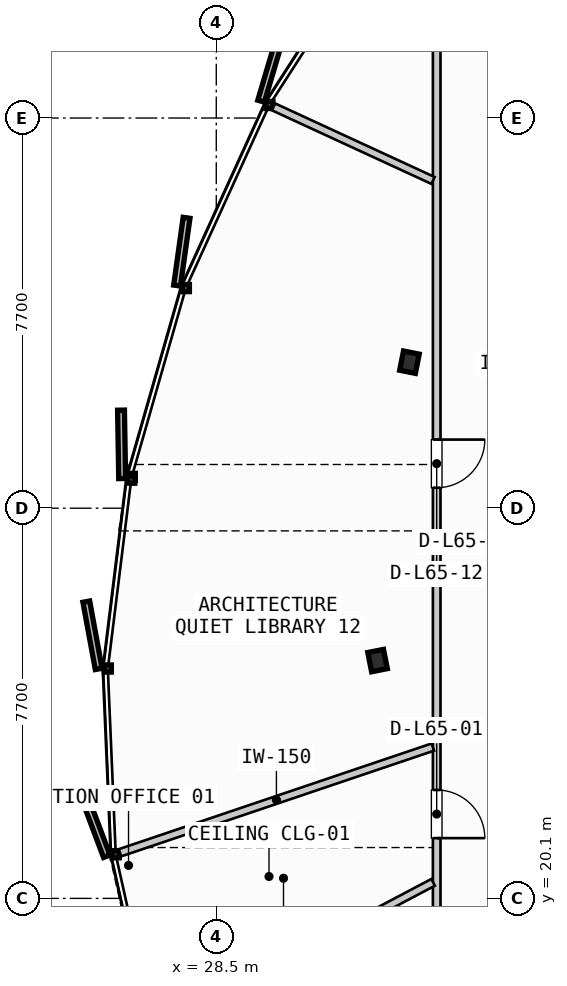
"""IFC4 building model, lengths in metres.
Left out: names, types, materials, properties, quantities, classifications, styles, units other than length and angle.
Written with IfcOpenShell. Run it as: python <this file> out.ifc"""

import sys

from ifc_helpers import new_model, si_unit, direction, frame, frame_2d, origin, origin_2d, place, context, subcontext, project, spatial, rectangle, i_section, extrude, source, transform, mapped, element, fill, save


model = new_model("IFC4")
c1 = context("Model", 3, precision=1e-05, world=origin(), true_north=direction((0.0, 1.0)))
c2 = subcontext(c1, "Body", "Model", "MODEL_VIEW")
j1 = project(units=[si_unit("LENGTHUNIT", "METRE"), si_unit("PLANEANGLEUNIT", "RADIAN")], contexts=[c1])
p1 = place(None, origin())
s1 = spatial("IfcSite", under=j1, at=p1, CompositionType="ELEMENT")
p2 = place(p1, origin())
s2 = spatial("IfcBuilding", under=s1, at=p2, CompositionType="ELEMENT")
p3 = place(p2, frame((0.0, 0.0, 249.1)))
s3 = spatial("IfcBuildingStorey", under=s2, at=p3, CompositionType="ELEMENT", Elevation=249.1)
m1 = source(origin(), c2, "Body", "SweptSolid", [
    extrude(i_section(OverallWidth=0.387, OverallDepth=0.316, WebThickness=0.019, FlangeThickness=0.028, FilletRadius=0.015, at=origin_2d()), origin(), (0.0, 0.0, 1.0), 3.21),
])
for number, where, z_axis, x_axis in (
    (1, (32.312, 30.682, 0.0), (0.0, 0.0, 1.0), (-0.981, 0.195, 0.0)),
    (2, (31.683, 24.793, 0.0), (0.0, 0.0, 1.0), (-0.981, -0.195, 0.0)),
):
    element("IfcColumn", number, at=place(p3, frame(where, z_axis=z_axis, x_axis=x_axis)), inside=s3, PredefinedType="COLUMN", context=c2, shape_type="MappedRepresentation", body=[
        mapped(m1, transform((0.0, 0.0, 0.0), scale=1.0)),
    ])
p4 = place(p3, frame((32.85, 37.562, 0.0), z_axis=(0.0, 0.0, 1.0), x_axis=(0.0, -1.0, 0.0)))
e3 = element("IfcWall", 3, at=p4, inside=s3, PredefinedType="PARTITIONING", context=c2, shape_type="SweptSolid", body=[
    extrude(rectangle(XDim=19.293, YDim=0.15, at=frame_2d((9.646, 0.0))), origin(), (0.0, 0.0, 1.0), 2.28),
])
p5 = place(p4, frame((15.323, 0.0, 0.0)))
e4 = element("IfcOpeningElement", 4, at=p5, cuts=e3, PredefinedType="OPENING", context=c2, shape_type="SweptSolid", body=[
    extrude(rectangle(XDim=0.95, YDim=2.15, at=frame_2d((0.475, 1.075))), frame((0.0, 0.085, 0.0), z_axis=(0.0, -1.0, 0.0), x_axis=(1.0, 0.0, 0.0)), (0.0, 0.0, 1.0), 0.17),
])
p6 = place(p4, frame((8.408, 0.0, 0.0)))
e5 = element("IfcOpeningElement", 5, at=p6, cuts=e3, PredefinedType="OPENING", context=c2, shape_type="SweptSolid", body=[
    extrude(rectangle(XDim=0.95, YDim=2.15, at=frame_2d((0.475, 1.075))), frame((0.0, 0.085, 0.0), z_axis=(0.0, -1.0, 0.0), x_axis=(1.0, 0.0, 0.0)), (0.0, 0.0, 1.0), 0.17),
])
p7 = place(p3, frame((32.774, 23.086, 0.0), z_axis=(0.0, 0.0, 1.0), x_axis=(-0.947398175778, -0.320057333196, 0.0)))
e6 = element("IfcWall", 6, at=p7, inside=s3, PredefinedType="PARTITIONING", context=c2, shape_type="SweptSolid", body=[
    extrude(rectangle(XDim=6.517, YDim=0.15, at=frame_2d((3.259, 0.0))), origin(), (0.0, 0.0, 1.0), 2.28),
])
p8 = place(p3, frame((32.779, 20.417, 0.0), z_axis=(0.0, 0.0, 1.0), x_axis=(-0.884246196303, -0.467021053406, 0.0)))
e7 = element("IfcWall", 7, at=p8, inside=s3, PredefinedType="PARTITIONING", context=c2, shape_type="SweptSolid", body=[
    extrude(rectangle(XDim=6.124, YDim=0.15, at=frame_2d((3.062, 0.0))), origin(), (0.0, 0.0, 1.0), 2.28),
])
p9 = place(p3, frame((32.777, 34.268, 0.0), z_axis=(0.0, 0.0, 1.0), x_axis=(-0.908017096263, 0.418933112673, 0.0)))
e8 = element("IfcWall", 8, at=p9, inside=s3, PredefinedType="PARTITIONING", context=c2, shape_type="SweptSolid", body=[
    extrude(rectangle(XDim=3.466, YDim=0.15, at=frame_2d((1.733, 0.0))), origin(), (0.0, 0.0, 1.0), 2.28),
])
m2 = source(origin(), c2, "Body", "SweptSolid", [
    extrude(rectangle(XDim=0.95, YDim=2.15, at=frame_2d((0.475, 1.075))), frame((0.0, 0.025, 0.0), z_axis=(0.0, -1.0, 0.0), x_axis=(1.0, 0.0, 0.0)), (0.0, 0.0, 1.0), 0.05),
])
p10 = place(p5, origin())
e9 = element("IfcDoor", 9, at=p10, inside=s3, OperationType="SINGLE_SWING_RIGHT", PredefinedType="DOOR", context=c2, shape_type="MappedRepresentation", body=[
    mapped(m2, transform((0.0, 0.0, 0.0), scale=1.0)),
])
fill(e4, e9)
p11 = place(p6, origin())
e10 = element("IfcDoor", 10, at=p11, inside=s3, OperationType="SINGLE_SWING_LEFT", PredefinedType="DOOR", context=c2, shape_type="MappedRepresentation", body=[
    mapped(m2, transform((0.0, 0.0, 0.0), scale=1.0)),
])
fill(e5, e10)
save(model, sys.argv[1])
